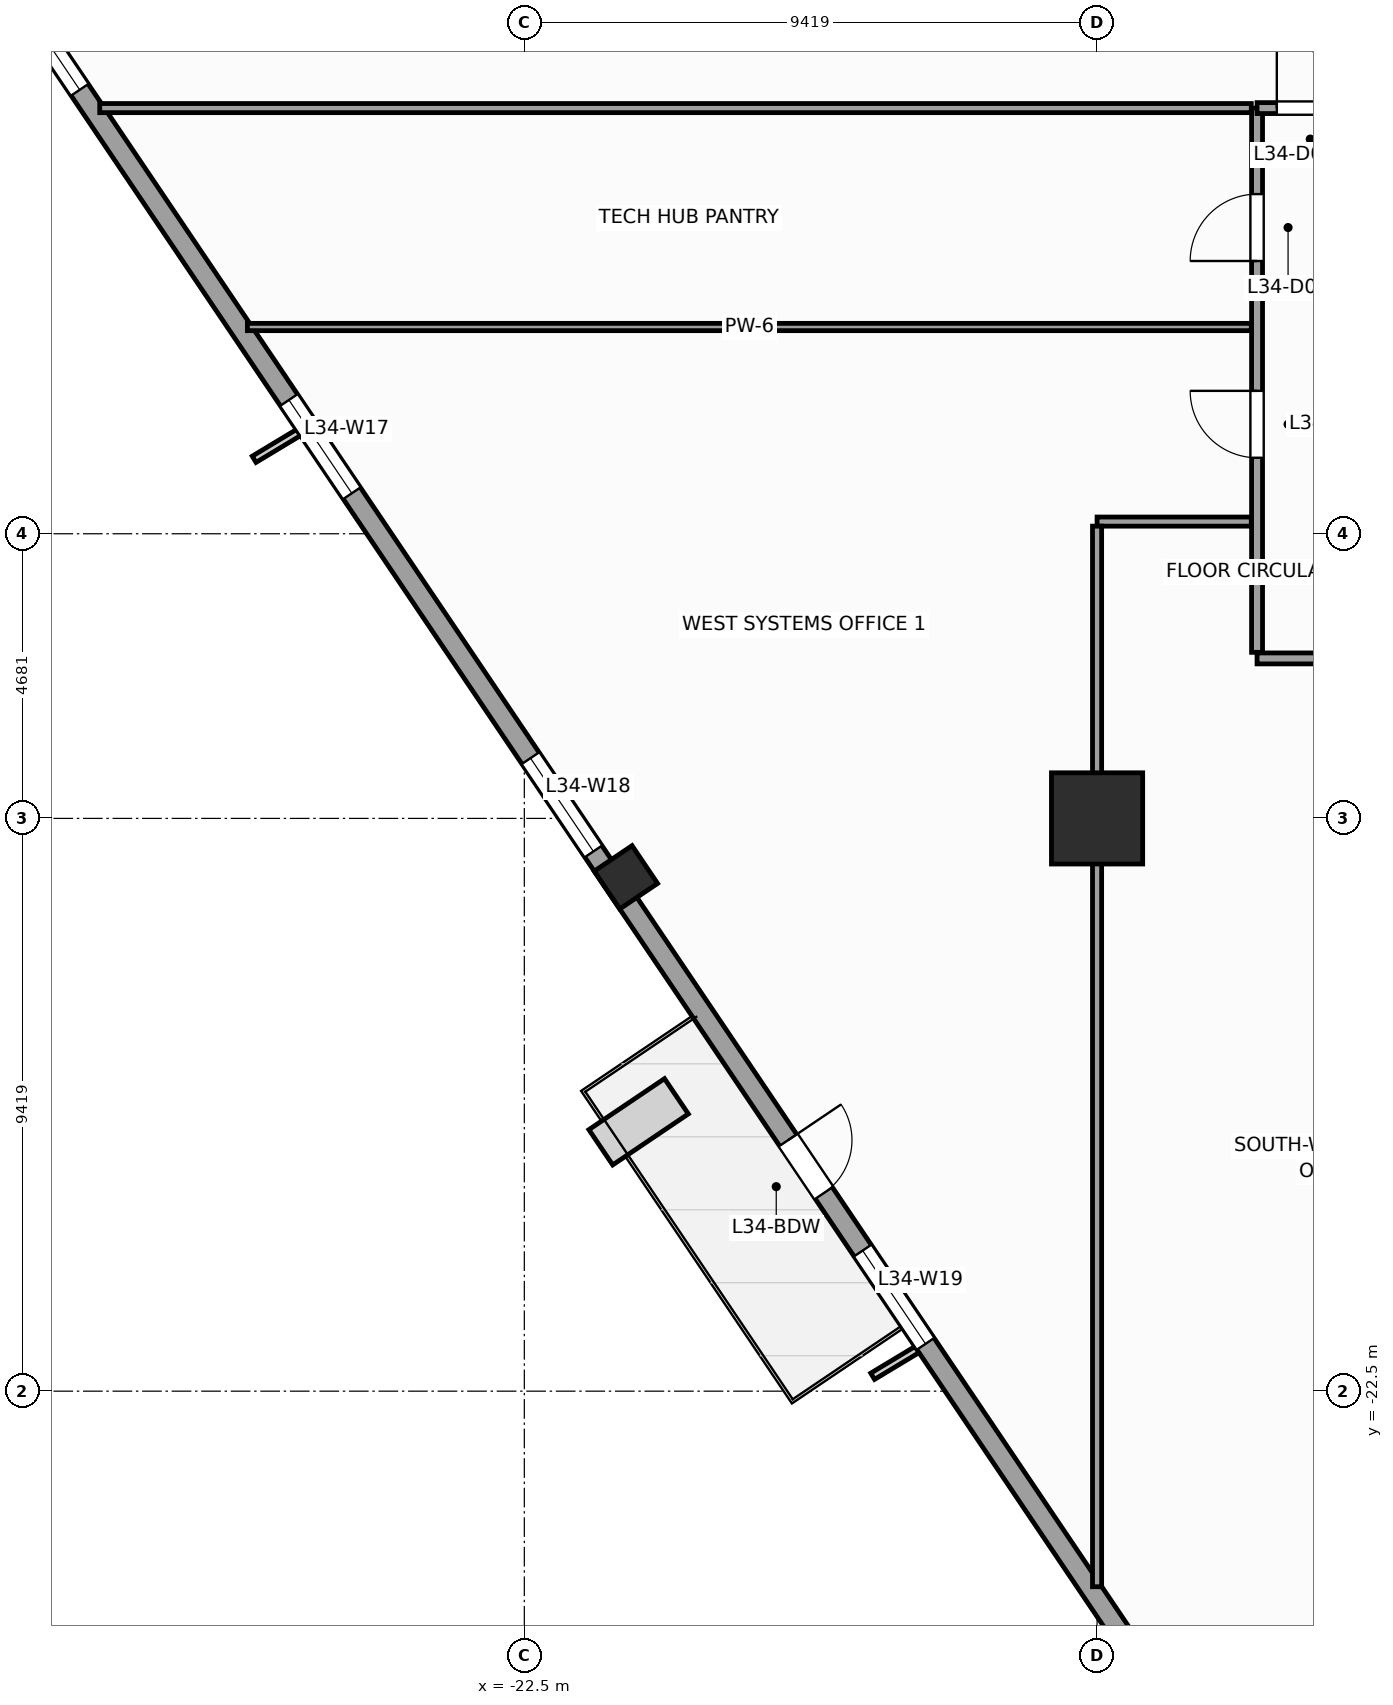
"""IFC4 building model, lengths in metres.
Left out: names, types, materials, properties, quantities, classifications, styles, units other than length and angle.
Written with IfcOpenShell. Run it as: python <this file> out.ifc"""

import sys

from ifc_helpers import new_model, si_unit, direction, frame, frame_2d, origin, origin_2d, place, context, subcontext, project, spatial, rectangle, extrude, source, transform, mapped, element, fill, save


model = new_model("IFC4")
c1 = context("Model", 3, precision=1e-05, world=origin(), true_north=direction((0.0, 1.0)))
c2 = subcontext(c1, "Body", "Model", "MODEL_VIEW")
j1 = project(units=[si_unit("LENGTHUNIT", "METRE"), si_unit("PLANEANGLEUNIT", "RADIAN")], contexts=[c1])
p1 = place(None, origin())
s1 = spatial("IfcSite", under=j1, at=p1, CompositionType="ELEMENT")
p2 = place(p1, origin())
s2 = spatial("IfcBuilding", under=s1, at=p2, CompositionType="ELEMENT")
p3 = place(p2, frame((0.0, 0.0, 144.4)))
s3 = spatial("IfcBuildingStorey", under=s2, at=p3, CompositionType="ELEMENT", Elevation=144.4)
m1 = source(origin(), c2, "Body", "SweptSolid", [
    extrude(rectangle(XDim=1.5, YDim=1.5, at=origin_2d()), origin(), (0.0, 0.0, 1.0), 4.0),
])
p4 = place(p3, frame((-13.081, -13.081, 0.0), z_axis=(0.0, 0.0, 1.0), x_axis=(1.0, 0.0, 0.0)))
e1 = element("IfcColumn", 1, at=p4, inside=s3, PredefinedType="COLUMN", context=c2, shape_type="MappedRepresentation", body=[
    mapped(m1, transform((0.0, 0.0, 0.0), scale=1.0)),
])
m2 = source(origin(), c2, "Body", "SweptSolid", [
    extrude(rectangle(XDim=0.75, YDim=0.75, at=origin_2d()), origin(), (0.0, 0.0, 1.0), 4.0),
])
p5 = place(p3, frame((-20.83, -14.05, 0.0), z_axis=(0.0, 0.0, 1.0), x_axis=(0.829037572555, 0.559192903471, 0.0)))
e2 = element("IfcColumn", 2, at=p5, inside=s3, PredefinedType="COLUMN", context=c2, shape_type="MappedRepresentation", body=[
    mapped(m2, transform((0.0, 0.0, 0.0), scale=1.0)),
])
p6 = place(p3, frame((-32.558, 2.972, 0.0), z_axis=(0.0, 0.0, 1.0), x_axis=(0.559194910251, -0.829036218961, 0.0)))
e3 = element("IfcWall", 3, at=p6, inside=s3, PredefinedType="STANDARD", context=c2, shape_type="SweptSolid", body=[
    extrude(rectangle(XDim=41.34, YDim=0.34, at=frame_2d((20.67, 0.0))), origin(), (0.0, 0.0, 1.0), 3.04),
])
p7 = place(p6, frame((25.745, 0.0, 0.0)))
e4 = element("IfcOpeningElement", 4, at=p7, cuts=e3, PredefinedType="OPENING", context=c2, shape_type="SweptSolid", body=[
    extrude(rectangle(XDim=1.05, YDim=2.25, at=frame_2d((0.525, 1.125))), frame((0.0, 0.18, 0.0), z_axis=(0.0, -1.0, 0.0), x_axis=(1.0, 0.0, 0.0)), (0.0, 0.0, 1.0), 0.36),
])
p8 = place(p6, frame((3.511, 0.0, 0.56)))
e5 = element("IfcOpeningElement", 5, at=p8, cuts=e3, PredefinedType="OPENING", context=c2, shape_type="SweptSolid", body=[
    extrude(rectangle(XDim=1.4, YDim=2.4, at=frame_2d((0.7, 1.2))), frame((0.0, 0.18, 0.0), z_axis=(0.0, -1.0, 0.0), x_axis=(1.0, 0.0, 0.0)), (0.0, 0.0, 1.0), 0.36),
])
p9 = place(p6, frame((11.064, 0.0, 0.61)))
e6 = element("IfcOpeningElement", 6, at=p9, cuts=e3, PredefinedType="OPENING", context=c2, shape_type="SweptSolid", body=[
    extrude(rectangle(XDim=1.85, YDim=2.35, at=frame_2d((0.925, 1.175))), frame((0.0, 0.18, 0.0), z_axis=(0.0, -1.0, 0.0), x_axis=(1.0, 0.0, 0.0)), (0.0, 0.0, 1.0), 0.36),
])
p10 = place(p6, frame((18.168, 0.0, 0.61)))
e7 = element("IfcOpeningElement", 7, at=p10, cuts=e3, PredefinedType="OPENING", context=c2, shape_type="SweptSolid", body=[
    extrude(rectangle(XDim=1.85, YDim=2.35, at=frame_2d((0.925, 1.175))), frame((0.0, 0.18, 0.0), z_axis=(0.0, -1.0, 0.0), x_axis=(1.0, 0.0, 0.0)), (0.0, 0.0, 1.0), 0.36),
])
p11 = place(p6, frame((27.936, 0.0, 0.61)))
e8 = element("IfcOpeningElement", 8, at=p11, cuts=e3, PredefinedType="OPENING", context=c2, shape_type="SweptSolid", body=[
    extrude(rectangle(XDim=1.85, YDim=2.35, at=frame_2d((0.925, 1.175))), frame((0.0, 0.18, 0.0), z_axis=(0.0, -1.0, 0.0), x_axis=(1.0, 0.0, 0.0)), (0.0, 0.0, 1.0), 0.36),
])
p12 = place(p6, frame((35.602, 0.0, 0.56)))
e9 = element("IfcOpeningElement", 9, at=p12, cuts=e3, PredefinedType="OPENING", context=c2, shape_type="SweptSolid", body=[
    extrude(rectangle(XDim=1.4, YDim=2.4, at=frame_2d((0.7, 1.2))), frame((0.0, 0.18, 0.0), z_axis=(0.0, -1.0, 0.0), x_axis=(1.0, 0.0, 0.0)), (0.0, 0.0, 1.0), 0.36),
])
p13 = place(p3, frame((-10.45, -10.45, 0.0), z_axis=(0.0, 0.0, 1.0), x_axis=(1.0, 0.0, 0.0)))
e10 = element("IfcWall", 10, at=p13, inside=s3, PredefinedType="PARTITIONING", context=c2, shape_type="SweptSolid", body=[
    extrude(rectangle(XDim=20.9, YDim=0.18, at=frame_2d((10.45, 0.0))), origin(), (0.0, 0.0, 1.0), 3.74),
])
p14 = place(p13, frame((2.339, 0.0, 0.0)))
e11 = element("IfcOpeningElement", 11, at=p14, cuts=e10, PredefinedType="OPENING", context=c2, shape_type="SweptSolid", body=[
    extrude(rectangle(XDim=1.1, YDim=2.2, at=frame_2d((0.55, 1.1))), frame((0.0, 0.1, 0.0), z_axis=(0.0, -1.0, 0.0), x_axis=(1.0, 0.0, 0.0)), (0.0, 0.0, 1.0), 0.2),
])
p15 = place(p13, frame((7.4, 0.0, 0.0)))
e12 = element("IfcOpeningElement", 12, at=p15, cuts=e10, PredefinedType="OPENING", context=c2, shape_type="SweptSolid", body=[
    extrude(rectangle(XDim=1.1, YDim=2.2, at=frame_2d((0.55, 1.1))), frame((0.0, 0.1, 0.0), z_axis=(0.0, -1.0, 0.0), x_axis=(1.0, 0.0, 0.0)), (0.0, 0.0, 1.0), 0.2),
])
p16 = place(p13, frame((12.4, 0.0, 0.0)))
e13 = element("IfcOpeningElement", 13, at=p16, cuts=e10, PredefinedType="OPENING", context=c2, shape_type="SweptSolid", body=[
    extrude(rectangle(XDim=1.1, YDim=2.2, at=frame_2d((0.55, 1.1))), frame((0.0, 0.1, 0.0), z_axis=(0.0, -1.0, 0.0), x_axis=(1.0, 0.0, 0.0)), (0.0, 0.0, 1.0), 0.2),
])
p17 = place(p13, frame((17.46, 0.0, 0.0)))
e14 = element("IfcOpeningElement", 14, at=p17, cuts=e10, PredefinedType="OPENING", context=c2, shape_type="SweptSolid", body=[
    extrude(rectangle(XDim=1.1, YDim=2.2, at=frame_2d((0.55, 1.1))), frame((0.0, 0.1, 0.0), z_axis=(0.0, -1.0, 0.0), x_axis=(1.0, 0.0, 0.0)), (0.0, 0.0, 1.0), 0.2),
])
p18 = place(p3, frame((-10.45, -10.35, 0.0), z_axis=(0.0, 0.0, 1.0), x_axis=(0.0, 1.0, 0.0)))
e15 = element("IfcWall", 15, at=p18, inside=s3, PredefinedType="PARTITIONING", context=c2, shape_type="SweptSolid", body=[
    extrude(rectangle(XDim=8.95, YDim=0.18, at=frame_2d((4.475, 0.0))), origin(), (0.0, 0.0, 1.0), 3.74),
])
p19 = place(p18, frame((6.436, 0.0, 0.0)))
e16 = element("IfcOpeningElement", 16, at=p19, cuts=e15, PredefinedType="OPENING", context=c2, shape_type="SweptSolid", body=[
    extrude(rectangle(XDim=1.1, YDim=2.2, at=frame_2d((0.55, 1.1))), frame((0.0, 0.1, 0.0), z_axis=(0.0, -1.0, 0.0), x_axis=(1.0, 0.0, 0.0)), (0.0, 0.0, 1.0), 0.2),
])
p20 = place(p18, frame((3.2, 0.0, 0.0)))
e17 = element("IfcOpeningElement", 17, at=p20, cuts=e15, PredefinedType="OPENING", context=c2, shape_type="SweptSolid", body=[
    extrude(rectangle(XDim=1.1, YDim=2.2, at=frame_2d((0.55, 1.1))), frame((0.0, 0.1, 0.0), z_axis=(0.0, -1.0, 0.0), x_axis=(1.0, 0.0, 0.0)), (0.0, 0.0, 1.0), 0.2),
])
p21 = place(p3, frame((-10.45, -1.4, 0.0), z_axis=(0.0, 0.0, 1.0), x_axis=(1.0, 0.0, 0.0)))
e18 = element("IfcWall", 18, at=p21, inside=s3, PredefinedType="PARTITIONING", context=c2, shape_type="SweptSolid", body=[
    extrude(rectangle(XDim=1.75, YDim=0.18, at=frame_2d((0.875, 0.0))), origin(), (0.0, 0.0, 1.0), 3.74),
])
p22 = place(p21, frame((0.325, 0.0, 0.0)))
e19 = element("IfcOpeningElement", 19, at=p22, cuts=e18, PredefinedType="OPENING", context=c2, shape_type="SweptSolid", body=[
    extrude(rectangle(XDim=1.1, YDim=2.2, at=frame_2d((0.55, 1.1))), frame((0.0, 0.1, 0.0), z_axis=(0.0, -1.0, 0.0), x_axis=(1.0, 0.0, 0.0)), (0.0, 0.0, 1.0), 0.2),
])
p23 = place(p3, frame((-29.482, -1.4, 0.0), z_axis=(0.0, 0.0, 1.0), x_axis=(1.0, 0.0, 0.0)))
e20 = element("IfcWall", 20, at=p23, inside=s3, PredefinedType="PARTITIONING", context=c2, shape_type="SweptSolid", body=[
    extrude(rectangle(XDim=18.938, YDim=0.15, at=frame_2d((9.469, 0.0))), origin(), (0.0, 0.0, 1.0), 3.74),
])
p24 = place(p3, frame((-10.545, -8.2, 0.0), z_axis=(0.0, 0.0, 1.0), x_axis=(-1.0, 0.0, 0.0)))
e21 = element("IfcWall", 21, at=p24, inside=s3, PredefinedType="PARTITIONING", context=c2, shape_type="SweptSolid", body=[
    extrude(rectangle(XDim=2.536, YDim=0.15, at=frame_2d((1.268, 0.0))), origin(), (0.0, 0.0, 1.0), 3.74),
])
p25 = place(p3, frame((-13.081, -8.275, 0.0), z_axis=(0.0, 0.0, 1.0), x_axis=(0.0, -1.0, 0.0)))
e22 = element("IfcWall", 22, at=p25, inside=s3, PredefinedType="PARTITIONING", context=c2, shape_type="SweptSolid", body=[
    extrude(rectangle(XDim=17.441, YDim=0.15, at=frame_2d((8.721, 0.0))), origin(), (0.0, 0.0, 1.0), 2.84),
])
p26 = place(p3, frame((-27.054, -5.0, 0.0), z_axis=(0.0, 0.0, 1.0), x_axis=(1.0, 0.0, 0.0)))
e23 = element("IfcWall", 23, at=p26, inside=s3, PredefinedType="PARTITIONING", context=c2, shape_type="SweptSolid", body=[
    extrude(rectangle(XDim=16.509, YDim=0.12, at=frame_2d((8.255, 0.0))), origin(), (0.0, 0.0, 1.0), 3.74),
])
m3 = source(origin(), c2, "Body", "SweptSolid", [
    extrude(rectangle(XDim=1.05, YDim=2.25, at=frame_2d((0.525, 1.125))), frame((0.0, 0.025, 0.0), z_axis=(0.0, -1.0, 0.0), x_axis=(1.0, 0.0, 0.0)), (0.0, 0.0, 1.0), 0.05),
])
p27 = place(p7, origin())
e24 = element("IfcDoor", 24, at=p27, inside=s3, OperationType="SINGLE_SWING_LEFT", PredefinedType="DOOR", context=c2, shape_type="MappedRepresentation", body=[
    mapped(m3, transform((0.0, 0.0, 0.0), scale=1.0)),
])
fill(e4, e24)
m4 = source(origin(), c2, "Body", "SweptSolid", [
    extrude(rectangle(XDim=1.4, YDim=2.4, at=frame_2d((0.7, 1.2))), frame((0.0, 0.03, 0.0), z_axis=(0.0, -1.0, 0.0), x_axis=(1.0, 0.0, 0.0)), (0.0, 0.0, 1.0), 0.06),
])
p28 = place(p8, origin())
e25 = element("IfcWindow", 25, at=p28, inside=s3, PartitioningType="SINGLE_PANEL", PredefinedType="WINDOW", context=c2, shape_type="MappedRepresentation", body=[
    mapped(m4, transform((0.0, 0.0, 0.0), scale=1.0)),
])
fill(e5, e25)
m5 = source(origin(), c2, "Body", "SweptSolid", [
    extrude(rectangle(XDim=1.85, YDim=2.35, at=frame_2d((0.925, 1.175))), frame((0.0, 0.03, 0.0), z_axis=(0.0, -1.0, 0.0), x_axis=(1.0, 0.0, 0.0)), (0.0, 0.0, 1.0), 0.06),
])
p29 = place(p9, origin())
e26 = element("IfcWindow", 26, at=p29, inside=s3, PartitioningType="SINGLE_PANEL", PredefinedType="WINDOW", context=c2, shape_type="MappedRepresentation", body=[
    mapped(m5, transform((0.0, 0.0, 0.0), scale=1.0)),
])
fill(e6, e26)
p30 = place(p10, origin())
e27 = element("IfcWindow", 27, at=p30, inside=s3, PartitioningType="SINGLE_PANEL", PredefinedType="WINDOW", context=c2, shape_type="MappedRepresentation", body=[
    mapped(m5, transform((0.0, 0.0, 0.0), scale=1.0)),
])
fill(e7, e27)
p31 = place(p11, origin())
e28 = element("IfcWindow", 28, at=p31, inside=s3, PartitioningType="SINGLE_PANEL", PredefinedType="WINDOW", context=c2, shape_type="MappedRepresentation", body=[
    mapped(m5, transform((0.0, 0.0, 0.0), scale=1.0)),
])
fill(e8, e28)
m6 = source(origin(), c2, "Body", "SweptSolid", [
    extrude(rectangle(XDim=1.1, YDim=2.2, at=frame_2d((0.55, 1.1))), frame((0.0, 0.025, 0.0), z_axis=(0.0, -1.0, 0.0), x_axis=(1.0, 0.0, 0.0)), (0.0, 0.0, 1.0), 0.05),
])
p32 = place(p22, origin())
e29 = element("IfcDoor", 29, at=p32, inside=s3, OperationType="SINGLE_SWING_LEFT", PredefinedType="DOOR", context=c2, shape_type="MappedRepresentation", body=[
    mapped(m6, transform((0.0, 0.0, 0.0), scale=1.0)),
])
fill(e19, e29)
p33 = place(p19, origin())
e30 = element("IfcDoor", 30, at=p33, inside=s3, OperationType="SINGLE_SWING_LEFT", PredefinedType="DOOR", context=c2, shape_type="MappedRepresentation", body=[
    mapped(m6, transform((0.0, 0.0, 0.0), scale=1.0)),
])
fill(e16, e30)
p34 = place(p20, origin())
e31 = element("IfcDoor", 31, at=p34, inside=s3, OperationType="SINGLE_SWING_RIGHT", PredefinedType="DOOR", context=c2, shape_type="MappedRepresentation", body=[
    mapped(m6, transform((0.0, 0.0, 0.0), scale=1.0)),
])
fill(e17, e31)
save(model, sys.argv[1])
